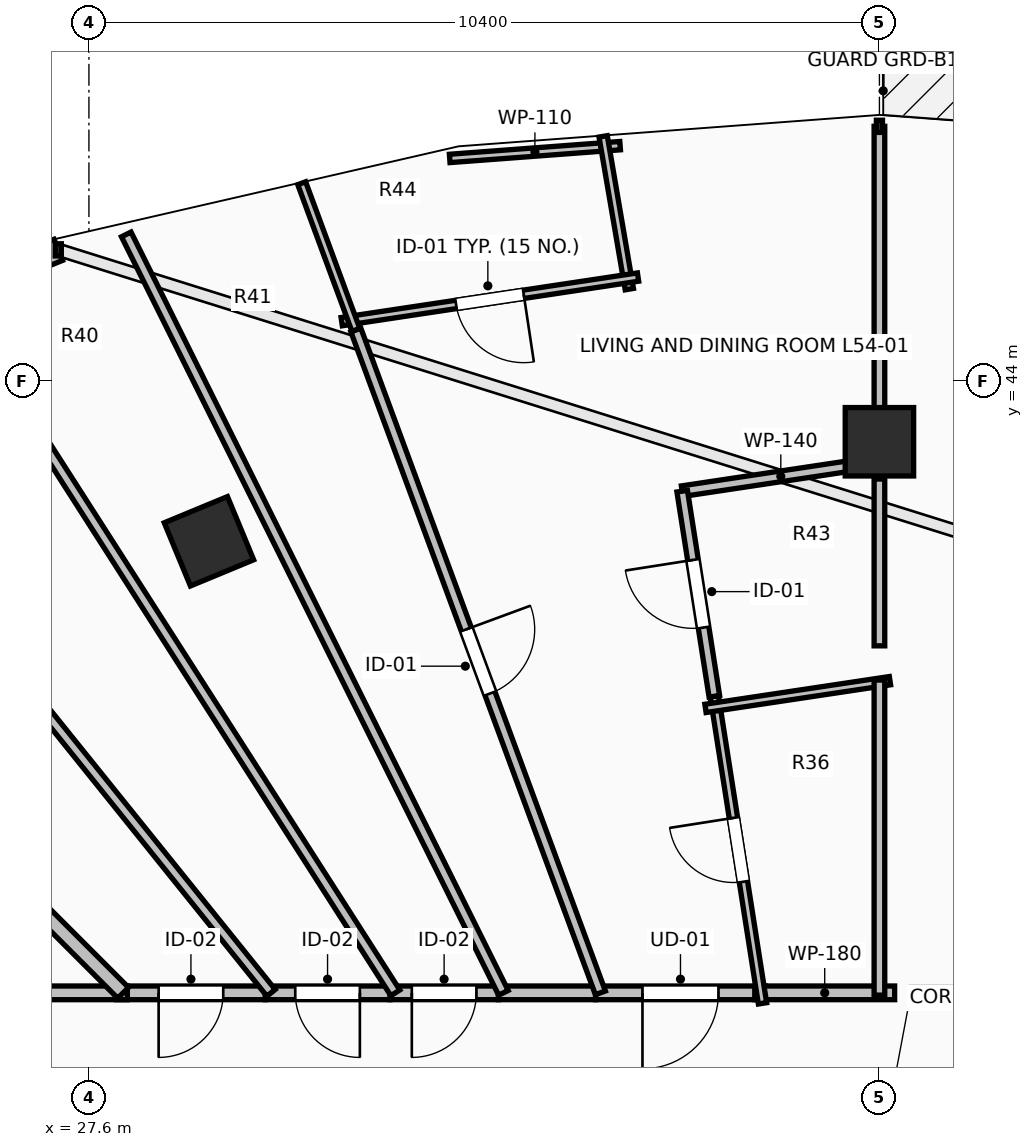
"""IFC4 building model, lengths in metres.
Left out: names, types, materials, properties, quantities, classifications, styles, units other than length and angle.
Written with IfcOpenShell. Run it as: python <this file> out.ifc"""

import sys

from ifc_helpers import new_model, si_unit, direction, frame, frame_2d, origin, origin_2d, place, context, subcontext, project, spatial, rectangle, extrude, element, fill, save


model = new_model("IFC4")
c1 = context("Model", 3, precision=1e-05, world=origin(), true_north=direction((0.0, 1.0)))
c2 = subcontext(c1, "Body", "Model", "MODEL_VIEW")
j1 = project(units=[si_unit("LENGTHUNIT", "METRE"), si_unit("PLANEANGLEUNIT", "RADIAN")], contexts=[c1])
p1 = place(None, origin())
s1 = spatial("IfcSite", under=j1, at=p1, CompositionType="ELEMENT")
p2 = place(p1, origin())
s2 = spatial("IfcBuilding", under=s1, at=p2, CompositionType="ELEMENT")
p3 = place(p2, frame((0.0, 0.0, 200.1)))
s3 = spatial("IfcBuildingStorey", under=s2, at=p3, CompositionType="ELEMENT", Elevation=200.1)
for number, where, z_axis, x_axis in (
    (1, (38.0, 43.2, 0.0), (0.0, 0.0, 1.0), (0.0, 1.0, 0.0)),
    (2, (29.179, 41.891, 0.0), (0.0, 0.0, 1.0), (-0.383, 0.924, 0.0)),
):
    element("IfcColumn", number, at=place(p3, frame(where, z_axis=z_axis, x_axis=x_axis)), inside=s3, PredefinedType="COLUMN", context=c2, shape_type="SweptSolid", body=[
        extrude(rectangle(XDim=0.9, YDim=0.9, at=origin_2d()), origin(), (0.0, 0.0, 1.0), 3.55),
    ])
p4 = place(p3, frame((27.197, 45.725, 0.0), z_axis=(0.0, 0.0, 1.0), x_axis=(-0.927111094334, -0.374786630981, 0.0)))
e3 = element("IfcWall", 3, at=p4, inside=s3, PredefinedType="STANDARD", context=c2, shape_type="SweptSolid", body=[
    extrude(rectangle(XDim=5.264, YDim=0.3, at=frame_2d((2.632, 0.0))), origin(), (0.0, 0.0, 1.0), 3.29),
])
p5 = place(p4, frame((0.258, 0.0, 0.85)))
e4 = element("IfcOpeningElement", 4, at=p5, cuts=e3, PredefinedType="OPENING", context=c2, shape_type="SweptSolid", body=[
    extrude(rectangle(XDim=0.9, YDim=1.8, at=frame_2d((0.45, 0.9))), frame((0.0, 0.165, 0.0), z_axis=(0.0, -1.0, 0.0), x_axis=(1.0, 0.0, 0.0)), (0.0, 0.0, 1.0), 0.33),
])
p6 = place(p4, frame((2.032, 0.0, 0.85)))
e5 = element("IfcOpeningElement", 5, at=p6, cuts=e3, PredefinedType="OPENING", context=c2, shape_type="SweptSolid", body=[
    extrude(rectangle(XDim=1.2, YDim=1.95, at=frame_2d((0.6, 0.975))), frame((0.0, 0.165, 0.0), z_axis=(0.0, -1.0, 0.0), x_axis=(1.0, 0.0, 0.0)), (0.0, 0.0, 1.0), 0.33),
])
p7 = place(p3, frame((36.5, 35.95, 0.0), z_axis=(0.0, 0.0, 1.0), x_axis=(-1.0, 0.0, 0.0)))
e6 = element("IfcWall", 6, at=p7, inside=s3, PredefinedType="PARTITIONING", context=c2, shape_type="SweptSolid", body=[
    extrude(rectangle(XDim=2.235, YDim=0.18, at=frame_2d((1.118, 0.0))), origin(), (0.0, 0.0, 1.0), 3.29),
])
p8 = place(p7, frame((0.617, 0.0, 0.0)))
e7 = element("IfcOpeningElement", 7, at=p8, cuts=e6, PredefinedType="OPENING", context=c2, shape_type="SweptSolid", body=[
    extrude(rectangle(XDim=1.0, YDim=2.15, at=frame_2d((0.5, 1.075))), frame((0.0, 0.105, 0.0), z_axis=(0.0, -1.0, 0.0), x_axis=(1.0, 0.0, 0.0)), (0.0, 0.0, 1.0), 0.21),
])
p9 = place(p3, frame((38.2, 35.95, 0.0), z_axis=(0.0, 0.0, 1.0), x_axis=(-1.0, 0.0, 0.0)))
e8 = element("IfcWall", 8, at=p9, inside=s3, PredefinedType="PARTITIONING", context=c2, shape_type="SweptSolid", body=[
    extrude(rectangle(XDim=1.84, YDim=0.18, at=frame_2d((0.92, 0.0))), origin(), (0.0, 0.0, 1.0), 3.29),
])
p10 = place(p3, frame((34.265, 35.95, 0.0), z_axis=(0.0, 0.0, 1.0), x_axis=(-1.0, 0.0, 0.0)))
e9 = element("IfcWall", 9, at=p10, inside=s3, PredefinedType="PARTITIONING", context=c2, shape_type="SweptSolid", body=[
    extrude(rectangle(XDim=1.279, YDim=0.18, at=frame_2d((0.639, 0.0))), origin(), (0.0, 0.0, 1.0), 3.29),
])
p11 = place(p3, frame((32.986, 35.95, 0.0), z_axis=(0.0, 0.0, 1.0), x_axis=(-1.0, 0.0, 0.0)))
e10 = element("IfcWall", 10, at=p11, inside=s3, PredefinedType="PARTITIONING", context=c2, shape_type="SweptSolid", body=[
    extrude(rectangle(XDim=1.426, YDim=0.18, at=frame_2d((0.713, 0.0))), origin(), (0.0, 0.0, 1.0), 3.29),
])
p12 = place(p11, frame((0.288, 0.0, 0.0)))
e11 = element("IfcOpeningElement", 11, at=p12, cuts=e10, PredefinedType="OPENING", context=c2, shape_type="SweptSolid", body=[
    extrude(rectangle(XDim=0.85, YDim=2.1, at=frame_2d((0.425, 1.05))), frame((0.0, 0.105, 0.0), z_axis=(0.0, -1.0, 0.0), x_axis=(1.0, 0.0, 0.0)), (0.0, 0.0, 1.0), 0.21),
])
p13 = place(p3, frame((31.56, 35.95, 0.0), z_axis=(0.0, 0.0, 1.0), x_axis=(-1.0, 0.0, 0.0)))
e12 = element("IfcWall", 12, at=p13, inside=s3, PredefinedType="PARTITIONING", context=c2, shape_type="SweptSolid", body=[
    extrude(rectangle(XDim=1.641, YDim=0.18, at=frame_2d((0.821, 0.0))), origin(), (0.0, 0.0, 1.0), 2.482),
])
p14 = place(p13, frame((0.396, 0.0, 0.0)))
e13 = element("IfcOpeningElement", 13, at=p14, cuts=e12, PredefinedType="OPENING", context=c2, shape_type="SweptSolid", body=[
    extrude(rectangle(XDim=0.85, YDim=2.1, at=frame_2d((0.425, 1.05))), frame((0.0, 0.105, 0.0), z_axis=(0.0, -1.0, 0.0), x_axis=(1.0, 0.0, 0.0)), (0.0, 0.0, 1.0), 0.21),
])
p15 = place(p3, frame((29.919, 35.95, 0.0), z_axis=(0.0, 0.0, 1.0), x_axis=(-1.0, 0.0, 0.0)))
e14 = element("IfcWall", 14, at=p15, inside=s3, PredefinedType="PARTITIONING", context=c2, shape_type="SweptSolid", body=[
    extrude(rectangle(XDim=1.954, YDim=0.18, at=frame_2d((0.977, 0.0))), origin(), (0.0, 0.0, 1.0), 2.482),
])
p16 = place(p15, frame((0.552, 0.0, 0.0)))
e15 = element("IfcOpeningElement", 15, at=p16, cuts=e14, PredefinedType="OPENING", context=c2, shape_type="SweptSolid", body=[
    extrude(rectangle(XDim=0.85, YDim=2.1, at=frame_2d((0.425, 1.05))), frame((0.0, 0.105, 0.0), z_axis=(0.0, -1.0, 0.0), x_axis=(1.0, 0.0, 0.0)), (0.0, 0.0, 1.0), 0.21),
])
p17 = place(p3, frame((28.105, 35.95, 0.0), z_axis=(0.0, 0.0, 1.0), x_axis=(-1.0, 0.0, 0.0)))
e16 = element("IfcWall", 16, at=p17, inside=s3, PredefinedType="PARTITIONING", context=c2, shape_type="SweptSolid", body=[
    extrude(rectangle(XDim=3.045, YDim=0.18, at=frame_2d((1.522, 0.0))), origin(), (0.0, 0.0, 1.0), 2.482),
])
p18 = place(p3, frame((36.462, 35.812, 0.0), z_axis=(0.0, 0.0, 1.0), x_axis=(-0.154883213323, 0.987932786292, 0.0)))
e17 = element("IfcWall", 17, at=p18, inside=s3, PredefinedType="PARTITIONING", context=c2, shape_type="SweptSolid", body=[
    extrude(rectangle(XDim=4.089, YDim=0.11, at=frame_2d((2.044, 0.0))), origin(), (0.0, 0.0, 1.0), 2.936),
])
p19 = place(p18, frame((1.619, 0.0, 0.0)))
e18 = element("IfcOpeningElement", 18, at=p19, cuts=e17, PredefinedType="OPENING", context=c2, shape_type="SweptSolid", body=[
    extrude(rectangle(XDim=0.85, YDim=2.1, at=frame_2d((0.425, 1.05))), frame((0.0, 0.07, 0.0), z_axis=(0.0, -1.0, 0.0), x_axis=(1.0, 0.0, 0.0)), (0.0, 0.0, 1.0), 0.14),
])
p20 = place(p3, frame((34.589, 47.095, 0.0), z_axis=(0.0, 0.0, 1.0), x_axis=(-0.997205784552, -0.074703569226, 0.0)))
e19 = element("IfcWall", 19, at=p20, inside=s3, PredefinedType="PARTITIONING", context=c2, shape_type="SweptSolid", body=[
    extrude(rectangle(XDim=2.249, YDim=0.11, at=frame_2d((1.124, 0.0))), origin(), (0.0, 0.0, 1.0), 3.29),
])
p21 = place(p3, frame((34.365, 47.218, 0.0), z_axis=(0.0, 0.0, 1.0), x_axis=(0.168804313657, -0.985649584635, 0.0)))
e20 = element("IfcWall", 20, at=p21, inside=s3, PredefinedType="PARTITIONING", context=c2, shape_type="SweptSolid", body=[
    extrude(rectangle(XDim=2.039, YDim=0.11, at=frame_2d((1.02, 0.0))), origin(), (0.0, 0.0, 1.0), 3.29),
])
p22 = place(p3, frame((34.824, 45.367, 0.0), z_axis=(0.0, 0.0, 1.0), x_axis=(-0.988877230123, -0.148734070555, 0.0)))
e21 = element("IfcWall", 21, at=p22, inside=s3, PredefinedType="PARTITIONING", context=c2, shape_type="SweptSolid", body=[
    extrude(rectangle(XDim=3.943, YDim=0.11, at=frame_2d((1.971, 0.0))), origin(), (0.0, 0.0, 1.0), 3.29),
])
p23 = place(p22, frame((1.521, 0.0, 0.0)))
e22 = element("IfcOpeningElement", 22, at=p23, cuts=e21, PredefinedType="OPENING", context=c2, shape_type="SweptSolid", body=[
    extrude(rectangle(XDim=0.9, YDim=2.1, at=frame_2d((0.45, 1.05))), frame((0.0, 0.07, 0.0), z_axis=(0.0, -1.0, 0.0), x_axis=(1.0, 0.0, 0.0)), (0.0, 0.0, 1.0), 0.14),
])
p24 = place(p3, frame((31.113, 44.67, 0.0), z_axis=(0.0, 0.0, 1.0), x_axis=(-0.346337161188, 0.938110105894, 0.0)))
e23 = element("IfcWall", 23, at=p24, inside=s3, PredefinedType="PARTITIONING", context=c2, shape_type="SweptSolid", body=[
    extrude(rectangle(XDim=2.059, YDim=0.11, at=frame_2d((1.03, 0.0))), origin(), (0.0, 0.0, 1.0), 3.29),
])
p25 = place(p3, frame((35.405, 42.55, 0.0), z_axis=(0.0, 0.0, 1.0), x_axis=(0.988900154693, 0.148581573718, 0.0)))
e24 = element("IfcWall", 24, at=p25, inside=s3, PredefinedType="PARTITIONING", context=c2, shape_type="SweptSolid", body=[
    extrude(rectangle(XDim=2.624, YDim=0.14, at=frame_2d((1.312, 0.0))), origin(), (0.0, 0.0, 1.0), 2.482),
])
p26 = place(p3, frame((35.828, 39.851, 0.0), z_axis=(0.0, 0.0, 1.0), x_axis=(-0.154971189464, 0.987918989814, 0.0)))
e25 = element("IfcWall", 25, at=p26, inside=s3, PredefinedType="PARTITIONING", context=c2, shape_type="SweptSolid", body=[
    extrude(rectangle(XDim=2.732, YDim=0.14, at=frame_2d((1.366, 0.0))), origin(), (0.0, 0.0, 1.0), 2.482),
])
p27 = place(p26, frame((0.916, 0.0, 0.0)))
e26 = element("IfcOpeningElement", 26, at=p27, cuts=e25, PredefinedType="OPENING", context=c2, shape_type="SweptSolid", body=[
    extrude(rectangle(XDim=0.9, YDim=2.1, at=frame_2d((0.45, 1.05))), frame((0.0, 0.085, 0.0), z_axis=(0.0, -1.0, 0.0), x_axis=(1.0, 0.0, 0.0)), (0.0, 0.0, 1.0), 0.17),
])
p28 = place(p3, frame((31.112, 44.67, 0.0), z_axis=(0.0, 0.0, 1.0), x_axis=(0.346109472243, -0.938194134081, 0.0)))
e27 = element("IfcWall", 27, at=p28, inside=s3, PredefinedType="PARTITIONING", context=c2, shape_type="SweptSolid", body=[
    extrude(rectangle(XDim=9.294, YDim=0.14, at=frame_2d((4.647, 0.0))), origin(), (0.0, 0.0, 1.0), 2.482),
])
p29 = place(p28, frame((4.197, 0.0, 0.0)))
e28 = element("IfcOpeningElement", 28, at=p29, cuts=e27, PredefinedType="OPENING", context=c2, shape_type="SweptSolid", body=[
    extrude(rectangle(XDim=0.9, YDim=2.1, at=frame_2d((0.45, 1.05))), frame((0.0, 0.085, 0.0), z_axis=(0.0, -1.0, 0.0), x_axis=(1.0, 0.0, 0.0)), (0.0, 0.0, 1.0), 0.17),
])
p30 = place(p3, frame((38.138, 40.057, 0.0), z_axis=(0.0, 0.0, 1.0), x_axis=(-0.988892526147, -0.148632337431, 0.0)))
e29 = element("IfcWall", 29, at=p30, inside=s3, PredefinedType="PARTITIONING", context=c2, shape_type="SweptSolid", body=[
    extrude(rectangle(XDim=2.454, YDim=0.11, at=frame_2d((1.227, 0.0))), origin(), (0.0, 0.0, 1.0), 3.022),
])
p31 = place(p3, frame((28.091, 45.928, 0.0), z_axis=(0.0, 0.0, 1.0), x_axis=(0.445267068418, -0.895397809793, 0.0)))
e30 = element("IfcWall", 30, at=p31, inside=s3, PredefinedType="PARTITIONING", context=c2, shape_type="SweptSolid", body=[
    extrude(rectangle(XDim=11.144, YDim=0.14, at=frame_2d((5.572, 0.0))), origin(), (0.0, 0.0, 1.0), 2.482),
])
p32 = place(p3, frame((25.749, 45.138, 0.0), z_axis=(0.0, 0.0, 1.0), x_axis=(0.539168632786, -0.842197830335, 0.0)))
e31 = element("IfcWall", 31, at=p32, inside=s3, PredefinedType="PARTITIONING", context=c2, shape_type="SweptSolid", body=[
    extrude(rectangle(XDim=10.909, YDim=0.14, at=frame_2d((5.455, 0.0))), origin(), (0.0, 0.0, 1.0), 2.482),
])
p33 = place(p3, frame((23.378, 44.178, 0.0), z_axis=(0.0, 0.0, 1.0), x_axis=(0.626756813732, -0.779214923137, 0.0)))
e32 = element("IfcWall", 32, at=p33, inside=s3, PredefinedType="PARTITIONING", context=c2, shape_type="SweptSolid", body=[
    extrude(rectangle(XDim=10.559, YDim=0.14, at=frame_2d((5.28, 0.0))), origin(), (0.0, 0.0, 1.0), 2.482),
])
p34 = place(p3, frame((21.041, 42.959, 0.0), z_axis=(0.0, 0.0, 1.0), x_axis=(0.707106781187, -0.707106781187, 0.0)))
e33 = element("IfcWall", 33, at=p34, inside=s3, PredefinedType="PARTITIONING", context=c2, shape_type="SweptSolid", body=[
    extrude(rectangle(XDim=9.912, YDim=0.2, at=frame_2d((4.956, 0.0))), origin(), (0.0, 0.0, 1.0), 2.482),
])
p35 = place(p3, frame((47.67, 35.95, 0.0), z_axis=(0.0, 0.0, 1.0), x_axis=(-1.0, 0.0, 0.0)))
e34 = element("IfcWall", 34, at=p35, inside=s3, PredefinedType="PARTITIONING", context=c2, shape_type="SweptSolid", body=[
    extrude(rectangle(XDim=9.25, YDim=0.14, at=frame_2d((4.625, 0.0))), origin(), (0.0, 0.0, 1.0), 2.936),
])
p36 = place(p3, frame((38.0, 43.16, 0.0), z_axis=(0.0, 0.0, 1.0), x_axis=(0.0, 1.0, 0.0)))
e35 = element("IfcWall", 35, at=p36, inside=s3, PredefinedType="PARTITIONING", context=c2, shape_type="SweptSolid", body=[
    extrude(rectangle(XDim=4.19, YDim=0.14, at=frame_2d((2.095, 0.0))), origin(), (0.0, 0.0, 1.0), 3.29),
])
p37 = place(p3, frame((38.0, 35.92, 0.0), z_axis=(0.0, 0.0, 1.0), x_axis=(0.0, 1.0, 0.0)))
e36 = element("IfcWall", 36, at=p37, inside=s3, PredefinedType="PARTITIONING", context=c2, shape_type="SweptSolid", body=[
    extrude(rectangle(XDim=4.145, YDim=0.14, at=frame_2d((2.073, 0.0))), origin(), (0.0, 0.0, 1.0), 2.936),
])
p38 = place(p3, frame((38.0, 40.515, 0.0), z_axis=(0.0, 0.0, 1.0), x_axis=(0.0, 1.0, 0.0)))
e37 = element("IfcWall", 37, at=p38, inside=s3, PredefinedType="PARTITIONING", context=c2, shape_type="SweptSolid", body=[
    extrude(rectangle(XDim=2.195, YDim=0.14, at=frame_2d((1.098, 0.0))), origin(), (0.0, 0.0, 1.0), 3.29),
])
p39 = place(p8, origin())
e38 = element("IfcDoor", 38, at=p39, inside=s3, OperationType="SINGLE_SWING_RIGHT", PredefinedType="DOOR", context=c2, shape_type="SweptSolid", body=[
    extrude(rectangle(XDim=1.0, YDim=2.15, at=frame_2d((0.5, 1.075))), frame((0.0, 0.025, 0.0), z_axis=(0.0, -1.0, 0.0), x_axis=(1.0, 0.0, 0.0)), (0.0, 0.0, 1.0), 0.05),
])
fill(e7, e38)
p40 = place(p19, origin())
e39 = element("IfcDoor", 39, at=p40, inside=s3, OperationType="SINGLE_SWING_RIGHT", PredefinedType="DOOR", context=c2, shape_type="SweptSolid", body=[
    extrude(rectangle(XDim=0.85, YDim=2.1, at=frame_2d((0.425, 1.05))), frame((0.0, 0.025, 0.0), z_axis=(0.0, -1.0, 0.0), x_axis=(1.0, 0.0, 0.0)), (0.0, 0.0, 1.0), 0.05),
])
fill(e18, e39)
p41 = place(p23, origin())
e40 = element("IfcDoor", 40, at=p41, inside=s3, OperationType="SINGLE_SWING_LEFT", PredefinedType="DOOR", context=c2, shape_type="SweptSolid", body=[
    extrude(rectangle(XDim=0.9, YDim=2.1, at=frame_2d((0.45, 1.05))), frame((0.0, 0.025, 0.0), z_axis=(0.0, -1.0, 0.0), x_axis=(1.0, 0.0, 0.0)), (0.0, 0.0, 1.0), 0.05),
])
fill(e22, e40)
p42 = place(p27, origin())
e41 = element("IfcDoor", 41, at=p42, inside=s3, OperationType="SINGLE_SWING_RIGHT", PredefinedType="DOOR", context=c2, shape_type="SweptSolid", body=[
    extrude(rectangle(XDim=0.9, YDim=2.1, at=frame_2d((0.45, 1.05))), frame((0.0, 0.025, 0.0), z_axis=(0.0, -1.0, 0.0), x_axis=(1.0, 0.0, 0.0)), (0.0, 0.0, 1.0), 0.05),
])
fill(e26, e41)
p43 = place(p29, origin())
e42 = element("IfcDoor", 42, at=p43, inside=s3, OperationType="SINGLE_SWING_LEFT", PredefinedType="DOOR", context=c2, shape_type="SweptSolid", body=[
    extrude(rectangle(XDim=0.9, YDim=2.1, at=frame_2d((0.45, 1.05))), frame((0.0, 0.025, 0.0), z_axis=(0.0, -1.0, 0.0), x_axis=(1.0, 0.0, 0.0)), (0.0, 0.0, 1.0), 0.05),
])
fill(e28, e42)
p44 = place(p12, origin())
e43 = element("IfcDoor", 43, at=p44, inside=s3, OperationType="SINGLE_SWING_RIGHT", PredefinedType="DOOR", context=c2, shape_type="SweptSolid", body=[
    extrude(rectangle(XDim=0.85, YDim=2.1, at=frame_2d((0.425, 1.05))), frame((0.0, 0.025, 0.0), z_axis=(0.0, -1.0, 0.0), x_axis=(1.0, 0.0, 0.0)), (0.0, 0.0, 1.0), 0.05),
])
fill(e11, e43)
p45 = place(p14, origin())
e44 = element("IfcDoor", 44, at=p45, inside=s3, OperationType="SINGLE_SWING_LEFT", PredefinedType="DOOR", context=c2, shape_type="SweptSolid", body=[
    extrude(rectangle(XDim=0.85, YDim=2.1, at=frame_2d((0.425, 1.05))), frame((0.0, 0.025, 0.0), z_axis=(0.0, -1.0, 0.0), x_axis=(1.0, 0.0, 0.0)), (0.0, 0.0, 1.0), 0.05),
])
fill(e13, e44)
p46 = place(p16, origin())
e45 = element("IfcDoor", 45, at=p46, inside=s3, OperationType="SINGLE_SWING_RIGHT", PredefinedType="DOOR", context=c2, shape_type="SweptSolid", body=[
    extrude(rectangle(XDim=0.85, YDim=2.1, at=frame_2d((0.425, 1.05))), frame((0.0, 0.025, 0.0), z_axis=(0.0, -1.0, 0.0), x_axis=(1.0, 0.0, 0.0)), (0.0, 0.0, 1.0), 0.05),
])
fill(e15, e45)
save(model, sys.argv[1])
